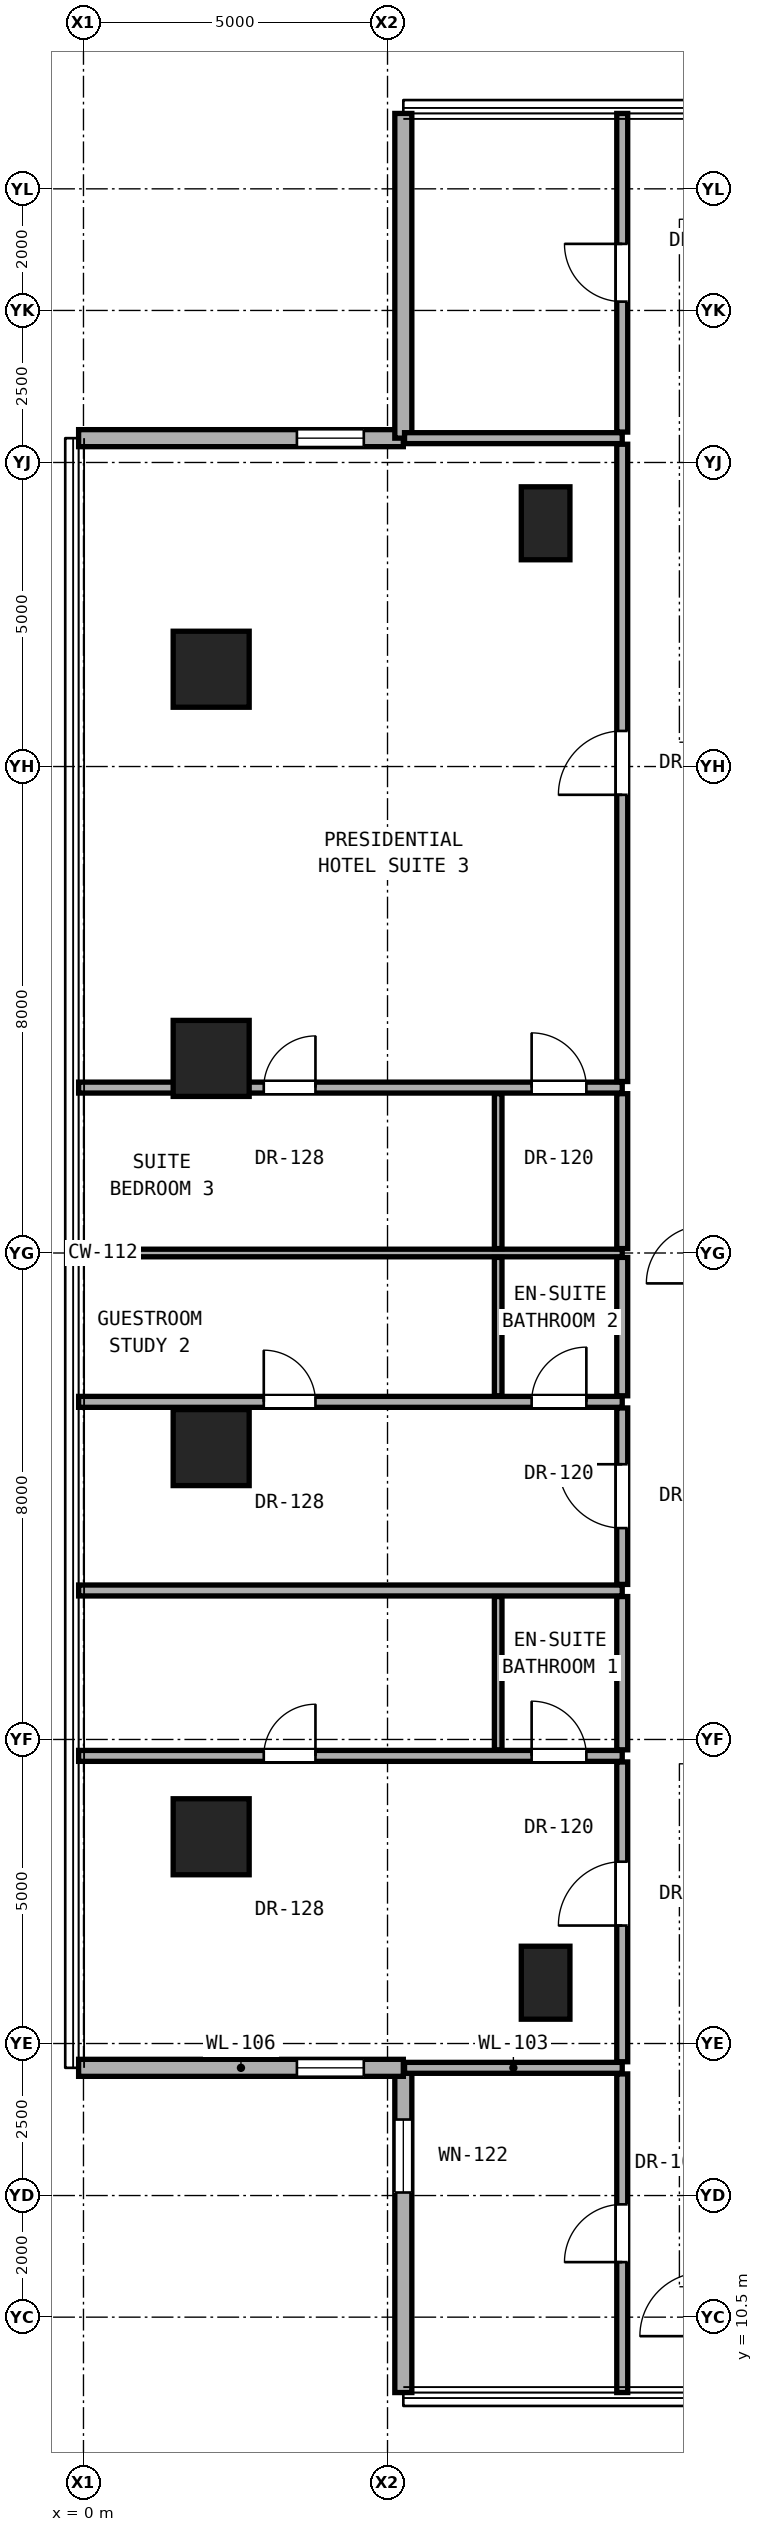
"""IFC4 building model, lengths in metres.
Left out: names, types, materials, properties, quantities, classifications, styles, units other than length and angle.
Written with IfcOpenShell. Run it as: python <this file> out.ifc"""

import sys

from ifc_helpers import new_model, si_unit, direction, frame, frame_2d, origin, origin_2d, place, context, subcontext, project, spatial, rectangle, hollow_rectangle, extrude, element, fill, save


model = new_model("IFC4")
c1 = context("Model", 3, precision=1e-05, world=origin(), true_north=direction((0.0, 1.0)))
c2 = subcontext(c1, "Body", "Model", "MODEL_VIEW")
j1 = project(units=[si_unit("LENGTHUNIT", "METRE"), si_unit("PLANEANGLEUNIT", "RADIAN")], contexts=[c1])
p1 = place(None, origin())
s1 = spatial("IfcSite", under=j1, at=p1, CompositionType="ELEMENT")
p2 = place(p1, origin())
s2 = spatial("IfcBuilding", under=s1, at=p2, CompositionType="ELEMENT")
p3 = place(p2, frame((0.0, 0.0, 52.1)))
s3 = spatial("IfcBuildingStorey", under=s2, at=p3, CompositionType="ELEMENT", Elevation=52.1)
for number, where, z_axis, x_axis in (
    (1, (2.1, 18.4, 0.0), (0.0, 0.0, 1.0), (1.0, 0.0, 0.0)),
    (2, (2.1, 24.8, 0.0), (0.0, 0.0, 1.0), (1.0, 0.0, 0.0)),
    (3, (2.1, 31.2, 0.0), (0.0, 0.0, 1.0), (1.0, 0.0, 0.0)),
    (4, (2.1, 37.6, 0.0), (0.0, 0.0, 1.0), (1.0, 0.0, 0.0)),
):
    element("IfcColumn", number, at=place(p3, frame(where, z_axis=z_axis, x_axis=x_axis)), inside=s3, PredefinedType="COLUMN", context=c2, shape_type="SweptSolid", body=[
        extrude(hollow_rectangle(XDim=1.25, YDim=1.25, WallThickness=0.07, at=origin_2d()), origin(), (0.0, 0.0, 1.0), 3.3),
    ])
for number, where, z_axis, x_axis in (
    (5, (7.6, 16.0, 0.0), (0.0, 0.0, 1.0), (1.0, 0.0, 0.0)),
    (6, (7.6, 40.0, 0.0), (0.0, 0.0, 1.0), (1.0, 0.0, 0.0)),
):
    element("IfcColumn", number, at=place(p3, frame(where, z_axis=z_axis, x_axis=x_axis)), inside=s3, PredefinedType="PILASTER", context=c2, shape_type="SweptSolid", body=[
        extrude(rectangle(XDim=0.8, YDim=1.2, at=origin_2d()), origin(), (0.0, 0.0, 1.0), 3.3),
    ])
p4 = place(p3, frame((5.26, 14.6, 0.0), z_axis=(0.0, 0.0, 1.0), x_axis=(0.0, -1.0, 0.0)))
e7 = element("IfcWall", 7, at=p4, inside=s3, PredefinedType="SOLIDWALL", context=c2, shape_type="SweptSolid", body=[
    extrude(rectangle(XDim=5.34, YDim=0.28, at=frame_2d((2.67, 0.0))), origin(), (0.0, 0.0, 1.0), 3.04),
])
p5 = place(p4, frame((0.85, 0.0, 0.79)))
e8 = element("IfcOpeningElement", 8, at=p5, cuts=e7, PredefinedType="OPENING", context=c2, shape_type="SweptSolid", body=[
    extrude(rectangle(XDim=1.2, YDim=2.1, at=frame_2d((0.6, 1.05))), frame((0.0, 0.15, 0.0), z_axis=(0.0, -1.0, 0.0), x_axis=(1.0, 0.0, 0.0)), (0.0, 0.0, 1.0), 0.3),
])
p6 = place(p3, frame((-0.08, 14.6, 0.0), z_axis=(0.0, 0.0, 1.0), x_axis=(1.0, 0.0, 0.0)))
e9 = element("IfcWall", 9, at=p6, inside=s3, PredefinedType="SOLIDWALL", context=c2, shape_type="SweptSolid", body=[
    extrude(rectangle(XDim=5.34, YDim=0.28, at=frame_2d((2.67, 0.0))), origin(), (0.0, 0.0, 1.0), 3.04),
])
p7 = place(p6, frame((3.59, 0.0, 0.85)))
e10 = element("IfcOpeningElement", 10, at=p7, cuts=e9, PredefinedType="OPENING", context=c2, shape_type="SweptSolid", body=[
    extrude(rectangle(XDim=1.1, YDim=2.0, at=frame_2d((0.55, 1.0))), frame((0.0, 0.15, 0.0), z_axis=(0.0, -1.0, 0.0), x_axis=(1.0, 0.0, 0.0)), (0.0, 0.0, 1.0), 0.3),
])
p8 = place(p3, frame((5.26, 41.4, 0.0), z_axis=(0.0, 0.0, 1.0), x_axis=(-1.0, 0.0, 0.0)))
e11 = element("IfcWall", 11, at=p8, inside=s3, PredefinedType="SOLIDWALL", context=c2, shape_type="SweptSolid", body=[
    extrude(rectangle(XDim=5.34, YDim=0.28, at=frame_2d((2.67, 0.0))), origin(), (0.0, 0.0, 1.0), 3.04),
])
p9 = place(p8, frame((0.65, 0.0, 0.85)))
e12 = element("IfcOpeningElement", 12, at=p9, cuts=e11, PredefinedType="OPENING", context=c2, shape_type="SweptSolid", body=[
    extrude(rectangle(XDim=1.1, YDim=2.0, at=frame_2d((0.55, 1.0))), frame((0.0, 0.15, 0.0), z_axis=(0.0, -1.0, 0.0), x_axis=(1.0, 0.0, 0.0)), (0.0, 0.0, 1.0), 0.3),
])
p10 = place(p3, frame((5.26, 46.74, 0.0), z_axis=(0.0, 0.0, 1.0), x_axis=(0.0, -1.0, 0.0)))
e13 = element("IfcWall", 13, at=p10, inside=s3, PredefinedType="SOLIDWALL", context=c2, shape_type="SweptSolid", body=[
    extrude(rectangle(XDim=5.34, YDim=0.28, at=frame_2d((2.67, 0.0))), origin(), (0.0, 0.0, 1.0), 3.04),
])
p11 = place(p3, frame((5.28, 14.6, 0.0), z_axis=(0.0, 0.0, 1.0), x_axis=(1.0, 0.0, 0.0)))
e14 = element("IfcWall", 14, at=p11, inside=s3, PredefinedType="PARTITIONING", context=c2, shape_type="SweptSolid", body=[
    extrude(rectangle(XDim=3.58, YDim=0.18, at=frame_2d((1.79, 0.0))), origin(), (0.0, 0.0, 1.0), 3.06),
])
p12 = place(p3, frame((-0.08, 19.73, 0.0), z_axis=(0.0, 0.0, 1.0), x_axis=(1.0, 0.0, 0.0)))
e15 = element("IfcWall", 15, at=p12, inside=s3, PredefinedType="PARTITIONING", context=c2, shape_type="SweptSolid", body=[
    extrude(rectangle(XDim=8.94, YDim=0.18, at=frame_2d((4.47, 0.0))), origin(), (0.0, 0.0, 1.0), 2.125),
])
p13 = place(p12, frame((3.045, 0.0, 0.0)))
e16 = element("IfcOpeningElement", 16, at=p13, cuts=e15, PredefinedType="OPENING", context=c2, shape_type="SweptSolid", body=[
    extrude(rectangle(XDim=0.85, YDim=2.01, at=frame_2d((0.425, 1.005))), frame((0.0, 0.1, 0.0), z_axis=(0.0, -1.0, 0.0), x_axis=(1.0, 0.0, 0.0)), (0.0, 0.0, 1.0), 0.2),
])
p14 = place(p12, frame((7.45, 0.0, 0.0)))
e17 = element("IfcOpeningElement", 17, at=p14, cuts=e15, PredefinedType="OPENING", context=c2, shape_type="SweptSolid", body=[
    extrude(rectangle(XDim=0.9, YDim=2.1, at=frame_2d((0.45, 1.05))), frame((0.0, 0.1, 0.0), z_axis=(0.0, -1.0, 0.0), x_axis=(1.0, 0.0, 0.0)), (0.0, 0.0, 1.0), 0.2),
])
p15 = place(p3, frame((-0.08, 22.45, 0.0), z_axis=(0.0, 0.0, 1.0), x_axis=(1.0, 0.0, 0.0)))
e18 = element("IfcWall", 18, at=p15, inside=s3, PredefinedType="PARTITIONING", context=c2, shape_type="SweptSolid", body=[
    extrude(rectangle(XDim=8.94, YDim=0.18, at=frame_2d((4.47, 0.0))), origin(), (0.0, 0.0, 1.0), 2.125),
])
p16 = place(p3, frame((-0.08, 25.552, 0.0), z_axis=(0.0, 0.0, 1.0), x_axis=(1.0, 0.0, 0.0)))
e19 = element("IfcWall", 19, at=p16, inside=s3, PredefinedType="PARTITIONING", context=c2, shape_type="SweptSolid", body=[
    extrude(rectangle(XDim=8.94, YDim=0.18, at=frame_2d((4.47, 0.0))), origin(), (0.0, 0.0, 1.0), 2.125),
])
p17 = place(p16, frame((3.045, 0.0, 0.0)))
e20 = element("IfcOpeningElement", 20, at=p17, cuts=e19, PredefinedType="OPENING", context=c2, shape_type="SweptSolid", body=[
    extrude(rectangle(XDim=0.85, YDim=2.01, at=frame_2d((0.425, 1.005))), frame((0.0, 0.1, 0.0), z_axis=(0.0, -1.0, 0.0), x_axis=(1.0, 0.0, 0.0)), (0.0, 0.0, 1.0), 0.2),
])
p18 = place(p16, frame((7.45, 0.0, 0.0)))
e21 = element("IfcOpeningElement", 21, at=p18, cuts=e19, PredefinedType="OPENING", context=c2, shape_type="SweptSolid", body=[
    extrude(rectangle(XDim=0.9, YDim=2.1, at=frame_2d((0.45, 1.05))), frame((0.0, 0.1, 0.0), z_axis=(0.0, -1.0, 0.0), x_axis=(1.0, 0.0, 0.0)), (0.0, 0.0, 1.0), 0.2),
])
p19 = place(p3, frame((-0.08, 28.0, 0.0), z_axis=(0.0, 0.0, 1.0), x_axis=(1.0, 0.0, 0.0)))
e22 = element("IfcWall", 22, at=p19, inside=s3, PredefinedType="PARTITIONING", context=c2, shape_type="SweptSolid", body=[
    extrude(rectangle(XDim=8.94, YDim=0.125, at=frame_2d((4.47, 0.0))), origin(), (0.0, 0.0, 1.0), 2.125),
])
p20 = place(p3, frame((-0.08, 30.72, 0.0), z_axis=(0.0, 0.0, 1.0), x_axis=(1.0, 0.0, 0.0)))
e23 = element("IfcWall", 23, at=p20, inside=s3, PredefinedType="PARTITIONING", context=c2, shape_type="SweptSolid", body=[
    extrude(rectangle(XDim=8.94, YDim=0.18, at=frame_2d((4.47, 0.0))), origin(), (0.0, 0.0, 1.0), 2.125),
])
p21 = place(p20, frame((3.045, 0.0, 0.0)))
e24 = element("IfcOpeningElement", 24, at=p21, cuts=e23, PredefinedType="OPENING", context=c2, shape_type="SweptSolid", body=[
    extrude(rectangle(XDim=0.85, YDim=2.01, at=frame_2d((0.425, 1.005))), frame((0.0, 0.1, 0.0), z_axis=(0.0, -1.0, 0.0), x_axis=(1.0, 0.0, 0.0)), (0.0, 0.0, 1.0), 0.2),
])
p22 = place(p20, frame((7.45, 0.0, 0.0)))
e25 = element("IfcOpeningElement", 25, at=p22, cuts=e23, PredefinedType="OPENING", context=c2, shape_type="SweptSolid", body=[
    extrude(rectangle(XDim=0.9, YDim=2.1, at=frame_2d((0.45, 1.05))), frame((0.0, 0.1, 0.0), z_axis=(0.0, -1.0, 0.0), x_axis=(1.0, 0.0, 0.0)), (0.0, 0.0, 1.0), 0.2),
])
p23 = place(p3, frame((5.28, 41.4, 0.0), z_axis=(0.0, 0.0, 1.0), x_axis=(1.0, 0.0, 0.0)))
e26 = element("IfcWall", 26, at=p23, inside=s3, PredefinedType="PARTITIONING", context=c2, shape_type="SweptSolid", body=[
    extrude(rectangle(XDim=3.58, YDim=0.18, at=frame_2d((1.79, 0.0))), origin(), (0.0, 0.0, 1.0), 3.06),
])
p24 = place(p3, frame((6.82, 19.83, 0.0), z_axis=(0.0, 0.0, 1.0), x_axis=(0.0, 1.0, 0.0)))
e27 = element("IfcWall", 27, at=p24, inside=s3, PredefinedType="PARTITIONING", context=c2, shape_type="SweptSolid", body=[
    extrude(rectangle(XDim=2.52, YDim=0.125, at=frame_2d((1.26, 0.0))), origin(), (0.0, 0.0, 1.0), 3.06),
])
p25 = place(p3, frame((6.82, 25.652, 0.0), z_axis=(0.0, 0.0, 1.0), x_axis=(0.0, 1.0, 0.0)))
e28 = element("IfcWall", 28, at=p25, inside=s3, PredefinedType="PARTITIONING", context=c2, shape_type="SweptSolid", body=[
    extrude(rectangle(XDim=2.275, YDim=0.125, at=frame_2d((1.138, 0.0))), origin(), (0.0, 0.0, 1.0), 3.06),
])
p26 = place(p3, frame((6.82, 28.073, 0.0), z_axis=(0.0, 0.0, 1.0), x_axis=(0.0, 1.0, 0.0)))
e29 = element("IfcWall", 29, at=p26, inside=s3, PredefinedType="PARTITIONING", context=c2, shape_type="SweptSolid", body=[
    extrude(rectangle(XDim=2.548, YDim=0.125, at=frame_2d((1.274, 0.0))), origin(), (0.0, 0.0, 1.0), 3.06),
])
p27 = place(p3, frame((8.86, 9.26, 0.0), z_axis=(0.0, 0.0, 1.0), x_axis=(0.0, 1.0, 0.0)))
e30 = element("IfcWall", 30, at=p27, inside=s3, PredefinedType="PARTITIONING", context=c2, shape_type="SweptSolid", body=[
    extrude(rectangle(XDim=5.24, YDim=0.18, at=frame_2d((2.62, 0.0))), origin(), (0.0, 0.0, 1.0), 3.06),
])
p28 = place(p27, frame((2.145, 0.0, 0.0)))
e31 = element("IfcOpeningElement", 31, at=p28, cuts=e30, PredefinedType="OPENING", context=c2, shape_type="SweptSolid", body=[
    extrude(rectangle(XDim=0.95, YDim=2.15, at=frame_2d((0.475, 1.075))), frame((0.0, 0.1, 0.0), z_axis=(0.0, -1.0, 0.0), x_axis=(1.0, 0.0, 0.0)), (0.0, 0.0, 1.0), 0.2),
])
p29 = place(p3, frame((8.86, 14.7, 0.0), z_axis=(0.0, 0.0, 1.0), x_axis=(0.0, 1.0, 0.0)))
e32 = element("IfcWall", 32, at=p29, inside=s3, PredefinedType="PARTITIONING", context=c2, shape_type="SweptSolid", body=[
    extrude(rectangle(XDim=4.93, YDim=0.18, at=frame_2d((2.465, 0.0))), origin(), (0.0, 0.0, 1.0), 2.436),
])
p30 = place(p29, frame((2.24, 0.0, 0.0)))
e33 = element("IfcOpeningElement", 33, at=p30, cuts=e32, PredefinedType="OPENING", context=c2, shape_type="SweptSolid", body=[
    extrude(rectangle(XDim=1.05, YDim=2.2, at=frame_2d((0.525, 1.1))), frame((0.0, 0.1, 0.0), z_axis=(0.0, -1.0, 0.0), x_axis=(1.0, 0.0, 0.0)), (0.0, 0.0, 1.0), 0.2),
])
p31 = place(p3, frame((8.86, 19.83, 0.0), z_axis=(0.0, 0.0, 1.0), x_axis=(0.0, 1.0, 0.0)))
e34 = element("IfcWall", 34, at=p31, inside=s3, PredefinedType="PARTITIONING", context=c2, shape_type="SweptSolid", body=[
    extrude(rectangle(XDim=2.52, YDim=0.18, at=frame_2d((1.26, 0.0))), origin(), (0.0, 0.0, 1.0), 3.06),
])
p32 = place(p3, frame((8.86, 22.55, 0.0), z_axis=(0.0, 0.0, 1.0), x_axis=(0.0, 1.0, 0.0)))
e35 = element("IfcWall", 35, at=p32, inside=s3, PredefinedType="PARTITIONING", context=c2, shape_type="SweptSolid", body=[
    extrude(rectangle(XDim=2.902, YDim=0.18, at=frame_2d((1.451, 0.0))), origin(), (0.0, 0.0, 1.0), 2.279),
])
p33 = place(p32, frame((0.926, 0.0, 0.0)))
e36 = element("IfcOpeningElement", 36, at=p33, cuts=e35, PredefinedType="OPENING", context=c2, shape_type="SweptSolid", body=[
    extrude(rectangle(XDim=1.05, YDim=2.2, at=frame_2d((0.525, 1.1))), frame((0.0, 0.1, 0.0), z_axis=(0.0, -1.0, 0.0), x_axis=(1.0, 0.0, 0.0)), (0.0, 0.0, 1.0), 0.2),
])
p34 = place(p3, frame((8.86, 25.652, 0.0), z_axis=(0.0, 0.0, 1.0), x_axis=(0.0, 1.0, 0.0)))
e37 = element("IfcWall", 37, at=p34, inside=s3, PredefinedType="PARTITIONING", context=c2, shape_type="SweptSolid", body=[
    extrude(rectangle(XDim=2.275, YDim=0.18, at=frame_2d((1.138, 0.0))), origin(), (0.0, 0.0, 1.0), 3.06),
])
p35 = place(p3, frame((8.86, 28.073, 0.0), z_axis=(0.0, 0.0, 1.0), x_axis=(0.0, 1.0, 0.0)))
e38 = element("IfcWall", 38, at=p35, inside=s3, PredefinedType="PARTITIONING", context=c2, shape_type="SweptSolid", body=[
    extrude(rectangle(XDim=2.548, YDim=0.18, at=frame_2d((1.274, 0.0))), origin(), (0.0, 0.0, 1.0), 3.06),
])
p36 = place(p3, frame((8.86, 30.82, 0.0), z_axis=(0.0, 0.0, 1.0), x_axis=(0.0, 1.0, 0.0)))
e39 = element("IfcWall", 39, at=p36, inside=s3, PredefinedType="PARTITIONING", context=c2, shape_type="SweptSolid", body=[
    extrude(rectangle(XDim=10.48, YDim=0.18, at=frame_2d((5.24, 0.0))), origin(), (0.0, 0.0, 1.0), 2.279),
])
p37 = place(p36, frame((4.715, 0.0, 0.0)))
e40 = element("IfcOpeningElement", 40, at=p37, cuts=e39, PredefinedType="OPENING", context=c2, shape_type="SweptSolid", body=[
    extrude(rectangle(XDim=1.05, YDim=2.2, at=frame_2d((0.525, 1.1))), frame((0.0, 0.1, 0.0), z_axis=(0.0, -1.0, 0.0), x_axis=(1.0, 0.0, 0.0)), (0.0, 0.0, 1.0), 0.2),
])
p38 = place(p3, frame((8.86, 41.5, 0.0), z_axis=(0.0, 0.0, 1.0), x_axis=(0.0, 1.0, 0.0)))
e41 = element("IfcWall", 41, at=p38, inside=s3, PredefinedType="PARTITIONING", context=c2, shape_type="SweptSolid", body=[
    extrude(rectangle(XDim=5.24, YDim=0.18, at=frame_2d((2.62, 0.0))), origin(), (0.0, 0.0, 1.0), 3.06),
])
p39 = place(p38, frame((2.145, 0.0, 0.0)))
e42 = element("IfcOpeningElement", 42, at=p39, cuts=e41, PredefinedType="OPENING", context=c2, shape_type="SweptSolid", body=[
    extrude(rectangle(XDim=0.95, YDim=2.15, at=frame_2d((0.475, 1.075))), frame((0.0, 0.1, 0.0), z_axis=(0.0, -1.0, 0.0), x_axis=(1.0, 0.0, 0.0)), (0.0, 0.0, 1.0), 0.2),
])
p40 = place(p5, origin())
e43 = element("IfcWindow", 43, at=p40, inside=s3, PartitioningType="SINGLE_PANEL", PredefinedType="WINDOW", context=c2, shape_type="SweptSolid", body=[
    extrude(rectangle(XDim=1.2, YDim=2.1, at=frame_2d((0.6, 1.05))), frame((0.0, 0.03, 0.0), z_axis=(0.0, -1.0, 0.0), x_axis=(1.0, 0.0, 0.0)), (0.0, 0.0, 1.0), 0.06),
])
fill(e8, e43)
p41 = place(p7, origin())
e44 = element("IfcWindow", 44, at=p41, inside=s3, PartitioningType="SINGLE_PANEL", PredefinedType="WINDOW", context=c2, shape_type="SweptSolid", body=[
    extrude(rectangle(XDim=1.1, YDim=2.0, at=frame_2d((0.55, 1.0))), frame((0.0, 0.03, 0.0), z_axis=(0.0, -1.0, 0.0), x_axis=(1.0, 0.0, 0.0)), (0.0, 0.0, 1.0), 0.06),
])
fill(e10, e44)
p42 = place(p9, origin())
e45 = element("IfcWindow", 45, at=p42, inside=s3, PartitioningType="SINGLE_PANEL", PredefinedType="WINDOW", context=c2, shape_type="SweptSolid", body=[
    extrude(rectangle(XDim=1.1, YDim=2.0, at=frame_2d((0.55, 1.0))), frame((0.0, 0.03, 0.0), z_axis=(0.0, -1.0, 0.0), x_axis=(1.0, 0.0, 0.0)), (0.0, 0.0, 1.0), 0.06),
])
fill(e12, e45)
p43 = place(p30, origin())
e46 = element("IfcDoor", 46, at=p43, inside=s3, OperationType="SINGLE_SWING_LEFT", PredefinedType="DOOR", context=c2, shape_type="SweptSolid", body=[
    extrude(rectangle(XDim=1.05, YDim=2.2, at=frame_2d((0.525, 1.1))), frame((0.0, 0.025, 0.0), z_axis=(0.0, -1.0, 0.0), x_axis=(1.0, 0.0, 0.0)), (0.0, 0.0, 1.0), 0.05),
])
fill(e33, e46)
p44 = place(p13, origin())
e47 = element("IfcDoor", 47, at=p44, inside=s3, OperationType="SINGLE_SWING_RIGHT", PredefinedType="DOOR", context=c2, shape_type="SweptSolid", body=[
    extrude(rectangle(XDim=0.85, YDim=2.01, at=frame_2d((0.425, 1.005))), frame((0.0, 0.025, 0.0), z_axis=(0.0, -1.0, 0.0), x_axis=(1.0, 0.0, 0.0)), (0.0, 0.0, 1.0), 0.05),
])
fill(e16, e47)
p45 = place(p14, origin())
e48 = element("IfcDoor", 48, at=p45, inside=s3, OperationType="SINGLE_SWING_LEFT", PredefinedType="DOOR", context=c2, shape_type="SweptSolid", body=[
    extrude(rectangle(XDim=0.9, YDim=2.1, at=frame_2d((0.45, 1.05))), frame((0.0, 0.025, 0.0), z_axis=(0.0, -1.0, 0.0), x_axis=(1.0, 0.0, 0.0)), (0.0, 0.0, 1.0), 0.05),
])
fill(e17, e48)
p46 = place(p33, origin())
e49 = element("IfcDoor", 49, at=p46, inside=s3, OperationType="SINGLE_SWING_RIGHT", PredefinedType="DOOR", context=c2, shape_type="SweptSolid", body=[
    extrude(rectangle(XDim=1.05, YDim=2.2, at=frame_2d((0.525, 1.1))), frame((0.0, 0.025, 0.0), z_axis=(0.0, -1.0, 0.0), x_axis=(1.0, 0.0, 0.0)), (0.0, 0.0, 1.0), 0.05),
])
fill(e36, e49)
p47 = place(p17, origin())
e50 = element("IfcDoor", 50, at=p47, inside=s3, OperationType="SINGLE_SWING_LEFT", PredefinedType="DOOR", context=c2, shape_type="SweptSolid", body=[
    extrude(rectangle(XDim=0.85, YDim=2.01, at=frame_2d((0.425, 1.005))), frame((0.0, 0.025, 0.0), z_axis=(0.0, -1.0, 0.0), x_axis=(1.0, 0.0, 0.0)), (0.0, 0.0, 1.0), 0.05),
])
fill(e20, e50)
p48 = place(p18, origin())
e51 = element("IfcDoor", 51, at=p48, inside=s3, OperationType="SINGLE_SWING_RIGHT", PredefinedType="DOOR", context=c2, shape_type="SweptSolid", body=[
    extrude(rectangle(XDim=0.9, YDim=2.1, at=frame_2d((0.45, 1.05))), frame((0.0, 0.025, 0.0), z_axis=(0.0, -1.0, 0.0), x_axis=(1.0, 0.0, 0.0)), (0.0, 0.0, 1.0), 0.05),
])
fill(e21, e51)
p49 = place(p37, origin())
e52 = element("IfcDoor", 52, at=p49, inside=s3, OperationType="SINGLE_SWING_LEFT", PredefinedType="DOOR", context=c2, shape_type="SweptSolid", body=[
    extrude(rectangle(XDim=1.05, YDim=2.2, at=frame_2d((0.525, 1.1))), frame((0.0, 0.025, 0.0), z_axis=(0.0, -1.0, 0.0), x_axis=(1.0, 0.0, 0.0)), (0.0, 0.0, 1.0), 0.05),
])
fill(e40, e52)
p50 = place(p21, origin())
e53 = element("IfcDoor", 53, at=p50, inside=s3, OperationType="SINGLE_SWING_RIGHT", PredefinedType="DOOR", context=c2, shape_type="SweptSolid", body=[
    extrude(rectangle(XDim=0.85, YDim=2.01, at=frame_2d((0.425, 1.005))), frame((0.0, 0.025, 0.0), z_axis=(0.0, -1.0, 0.0), x_axis=(1.0, 0.0, 0.0)), (0.0, 0.0, 1.0), 0.05),
])
fill(e24, e53)
p51 = place(p22, origin())
e54 = element("IfcDoor", 54, at=p51, inside=s3, OperationType="SINGLE_SWING_LEFT", PredefinedType="DOOR", context=c2, shape_type="SweptSolid", body=[
    extrude(rectangle(XDim=0.9, YDim=2.1, at=frame_2d((0.45, 1.05))), frame((0.0, 0.025, 0.0), z_axis=(0.0, -1.0, 0.0), x_axis=(1.0, 0.0, 0.0)), (0.0, 0.0, 1.0), 0.05),
])
fill(e25, e54)
p52 = place(p28, origin())
e55 = element("IfcDoor", 55, at=p52, inside=s3, OperationType="SINGLE_SWING_LEFT", PredefinedType="DOOR", context=c2, shape_type="SweptSolid", body=[
    extrude(rectangle(XDim=0.95, YDim=2.15, at=frame_2d((0.475, 1.075))), frame((0.0, 0.025, 0.0), z_axis=(0.0, -1.0, 0.0), x_axis=(1.0, 0.0, 0.0)), (0.0, 0.0, 1.0), 0.05),
])
fill(e31, e55)
p53 = place(p39, origin())
e56 = element("IfcDoor", 56, at=p53, inside=s3, OperationType="SINGLE_SWING_RIGHT", PredefinedType="DOOR", context=c2, shape_type="SweptSolid", body=[
    extrude(rectangle(XDim=0.95, YDim=2.15, at=frame_2d((0.475, 1.075))), frame((0.0, 0.025, 0.0), z_axis=(0.0, -1.0, 0.0), x_axis=(1.0, 0.0, 0.0)), (0.0, 0.0, 1.0), 0.05),
])
fill(e42, e56)
save(model, sys.argv[1])
